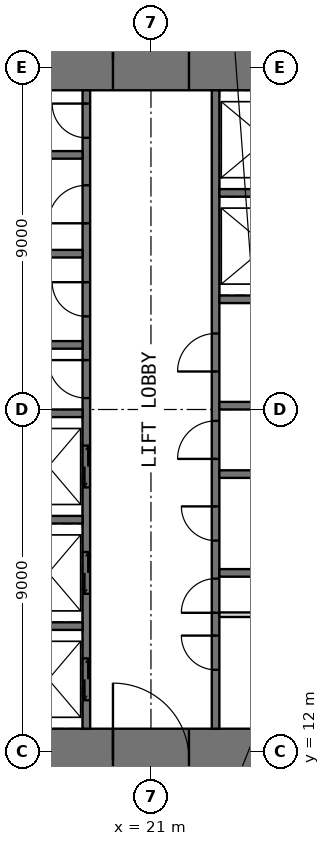
"""IFC4 building model, lengths in metres.
Left out: names, types, materials, properties, quantities, classifications, styles, units other than length and angle.
Written with IfcOpenShell. Run it as: python <this file> out.ifc"""

import sys

from ifc_helpers import new_model, si_unit, direction, frame, frame_2d, origin, place, context, subcontext, project, spatial, rectangle, extrude, element, fill, save


model = new_model("IFC4")
c1 = context("Model", 3, precision=1e-05, world=origin(), true_north=direction((0.0, 1.0)))
c2 = subcontext(c1, "Body", "Model", "MODEL_VIEW")
j1 = project(units=[si_unit("LENGTHUNIT", "METRE"), si_unit("PLANEANGLEUNIT", "RADIAN")], contexts=[c1])
p1 = place(None, origin())
s1 = spatial("IfcSite", under=j1, at=p1, CompositionType="ELEMENT")
p2 = place(p1, origin())
s2 = spatial("IfcBuilding", under=s1, at=p2, CompositionType="ELEMENT")
p3 = place(p2, frame((0.0, 0.0, 132.5)))
s3 = spatial("IfcBuildingStorey", under=s2, at=p3, CompositionType="ELEMENT", Elevation=132.5)
p4 = place(p3, frame((11.0, 11.8, -0.05), z_axis=(0.0, 0.0, 1.0), x_axis=(1.0, 0.0, 0.0)))
e1 = element("IfcWall", 1, at=p4, inside=s3, PredefinedType="SHEAR", context=c2, shape_type="SweptSolid", body=[
    extrude(rectangle(XDim=20.0, YDim=1.6, at=frame_2d((10.0, 0.0))), origin(), (0.0, 0.0, 1.0), 4.0),
])
p5 = place(p4, frame((9.0, 0.0, 0.05)))
e2 = element("IfcOpeningElement", 2, at=p5, cuts=e1, PredefinedType="OPENING", context=c2, shape_type="SweptSolid", body=[
    extrude(rectangle(XDim=2.0, YDim=2.2, at=frame_2d((1.0, 1.1))), frame((0.0, 0.81, 0.0), z_axis=(0.0, -1.0, 0.0), x_axis=(1.0, 0.0, 0.0)), (0.0, 0.0, 1.0), 1.62),
])
p6 = place(p3, frame((11.0, 30.2, -0.05), z_axis=(0.0, 0.0, 1.0), x_axis=(1.0, 0.0, 0.0)))
e3 = element("IfcWall", 3, at=p6, inside=s3, PredefinedType="SHEAR", context=c2, shape_type="SweptSolid", body=[
    extrude(rectangle(XDim=20.0, YDim=1.6, at=frame_2d((10.0, 0.0))), origin(), (0.0, 0.0, 1.0), 4.0),
])
p7 = place(p6, frame((9.0, 0.0, 0.05)))
e4 = element("IfcOpeningElement", 4, at=p7, cuts=e3, PredefinedType="OPENING", context=c2, shape_type="SweptSolid", body=[
    extrude(rectangle(XDim=2.0, YDim=2.2, at=frame_2d((1.0, 1.1))), frame((0.0, 0.81, 0.0), z_axis=(0.0, -1.0, 0.0), x_axis=(1.0, 0.0, 0.0)), (0.0, 0.0, 1.0), 1.62),
])
p8 = place(p3, frame((19.3, 12.6, -0.05), z_axis=(0.0, 0.0, 1.0), x_axis=(0.0, 1.0, 0.0)))
e5 = element("IfcWall", 5, at=p8, inside=s3, PredefinedType="SHEAR", context=c2, shape_type="SweptSolid", body=[
    extrude(rectangle(XDim=16.8, YDim=0.2, at=frame_2d((8.4, 0.0))), origin(), (0.0, 0.0, 1.0), 4.0),
])
p9 = place(p8, frame((8.7, 0.0, 0.05)))
e6 = element("IfcOpeningElement", 6, at=p9, cuts=e5, PredefinedType="OPENING", context=c2, shape_type="SweptSolid", body=[
    extrude(rectangle(XDim=1.0, YDim=2.2, at=frame_2d((0.5, 1.1))), frame((0.0, 0.11, 0.0), z_axis=(0.0, -1.0, 0.0), x_axis=(1.0, 0.0, 0.0)), (0.0, 0.0, 1.0), 0.22),
])
p10 = place(p8, frame((10.85, 0.0, 0.05)))
e7 = element("IfcOpeningElement", 7, at=p10, cuts=e5, PredefinedType="OPENING", context=c2, shape_type="SweptSolid", body=[
    extrude(rectangle(XDim=0.9, YDim=2.2, at=frame_2d((0.45, 1.1))), frame((0.0, 0.11, 0.0), z_axis=(0.0, -1.0, 0.0), x_axis=(1.0, 0.0, 0.0)), (0.0, 0.0, 1.0), 0.22),
])
p11 = place(p8, frame((13.3, 0.0, 0.05)))
e8 = element("IfcOpeningElement", 8, at=p11, cuts=e5, PredefinedType="OPENING", context=c2, shape_type="SweptSolid", body=[
    extrude(rectangle(XDim=1.0, YDim=2.2, at=frame_2d((0.5, 1.1))), frame((0.0, 0.11, 0.0), z_axis=(0.0, -1.0, 0.0), x_axis=(1.0, 0.0, 0.0)), (0.0, 0.0, 1.0), 0.22),
])
p12 = place(p8, frame((15.55, 0.0, 0.05)))
e9 = element("IfcOpeningElement", 9, at=p12, cuts=e5, PredefinedType="OPENING", context=c2, shape_type="SweptSolid", body=[
    extrude(rectangle(XDim=0.9, YDim=2.2, at=frame_2d((0.45, 1.1))), frame((0.0, 0.11, 0.0), z_axis=(0.0, -1.0, 0.0), x_axis=(1.0, 0.0, 0.0)), (0.0, 0.0, 1.0), 0.22),
])
p13 = place(p8, frame((0.75, 0.0, 0.05)))
e10 = element("IfcOpeningElement", 10, at=p13, cuts=e5, PredefinedType="OPENING", context=c2, shape_type="SweptSolid", body=[
    extrude(rectangle(XDim=1.1, YDim=2.2, at=frame_2d((0.55, 1.1))), frame((0.0, 0.11, 0.0), z_axis=(0.0, -1.0, 0.0), x_axis=(1.0, 0.0, 0.0)), (0.0, 0.0, 1.0), 0.22),
])
p14 = place(p8, frame((3.55, 0.0, 0.05)))
e11 = element("IfcOpeningElement", 11, at=p14, cuts=e5, PredefinedType="OPENING", context=c2, shape_type="SweptSolid", body=[
    extrude(rectangle(XDim=1.1, YDim=2.2, at=frame_2d((0.55, 1.1))), frame((0.0, 0.11, 0.0), z_axis=(0.0, -1.0, 0.0), x_axis=(1.0, 0.0, 0.0)), (0.0, 0.0, 1.0), 0.22),
])
p15 = place(p8, frame((6.35, 0.0, 0.05)))
e12 = element("IfcOpeningElement", 12, at=p15, cuts=e5, PredefinedType="OPENING", context=c2, shape_type="SweptSolid", body=[
    extrude(rectangle(XDim=1.1, YDim=2.2, at=frame_2d((0.55, 1.1))), frame((0.0, 0.11, 0.0), z_axis=(0.0, -1.0, 0.0), x_axis=(1.0, 0.0, 0.0)), (0.0, 0.0, 1.0), 0.22),
])
p16 = place(p3, frame((22.7, 12.6, -0.05), z_axis=(0.0, 0.0, 1.0), x_axis=(0.0, 1.0, 0.0)))
e13 = element("IfcWall", 13, at=p16, inside=s3, PredefinedType="SHEAR", context=c2, shape_type="SweptSolid", body=[
    extrude(rectangle(XDim=16.8, YDim=0.2, at=frame_2d((8.4, 0.0))), origin(), (0.0, 0.0, 1.0), 4.0),
])
p17 = place(p16, frame((3.05, 0.0, 0.05)))
e14 = element("IfcOpeningElement", 14, at=p17, cuts=e13, PredefinedType="OPENING", context=c2, shape_type="SweptSolid", body=[
    extrude(rectangle(XDim=0.9, YDim=2.2, at=frame_2d((0.45, 1.1))), frame((0.0, 0.11, 0.0), z_axis=(0.0, -1.0, 0.0), x_axis=(1.0, 0.0, 0.0)), (0.0, 0.0, 1.0), 0.22),
])
p18 = place(p16, frame((7.1, 0.0, 0.05)))
e15 = element("IfcOpeningElement", 15, at=p18, cuts=e13, PredefinedType="OPENING", context=c2, shape_type="SweptSolid", body=[
    extrude(rectangle(XDim=1.0, YDim=2.2, at=frame_2d((0.5, 1.1))), frame((0.0, 0.11, 0.0), z_axis=(0.0, -1.0, 0.0), x_axis=(1.0, 0.0, 0.0)), (0.0, 0.0, 1.0), 0.22),
])
p19 = place(p16, frame((1.55, 0.0, 0.05)))
e16 = element("IfcOpeningElement", 16, at=p19, cuts=e13, PredefinedType="OPENING", context=c2, shape_type="SweptSolid", body=[
    extrude(rectangle(XDim=0.9, YDim=2.2, at=frame_2d((0.45, 1.1))), frame((0.0, 0.11, 0.0), z_axis=(0.0, -1.0, 0.0), x_axis=(1.0, 0.0, 0.0)), (0.0, 0.0, 1.0), 0.22),
])
p20 = place(p16, frame((4.95, 0.0, 0.05)))
e17 = element("IfcOpeningElement", 17, at=p20, cuts=e13, PredefinedType="OPENING", context=c2, shape_type="SweptSolid", body=[
    extrude(rectangle(XDim=0.9, YDim=2.2, at=frame_2d((0.45, 1.1))), frame((0.0, 0.11, 0.0), z_axis=(0.0, -1.0, 0.0), x_axis=(1.0, 0.0, 0.0)), (0.0, 0.0, 1.0), 0.22),
])
p21 = place(p16, frame((9.4, 0.0, 0.05)))
e18 = element("IfcOpeningElement", 18, at=p21, cuts=e13, PredefinedType="OPENING", context=c2, shape_type="SweptSolid", body=[
    extrude(rectangle(XDim=1.0, YDim=2.2, at=frame_2d((0.5, 1.1))), frame((0.0, 0.11, 0.0), z_axis=(0.0, -1.0, 0.0), x_axis=(1.0, 0.0, 0.0)), (0.0, 0.0, 1.0), 0.22),
])
for number, where, z_axis, x_axis in (
    (19, (16.0, 15.3, -0.05), (0.0, 0.0, 1.0), (1.0, 0.0, 0.0)),
    (20, (16.0, 18.1, -0.05), (0.0, 0.0, 1.0), (1.0, 0.0, 0.0)),
    (21, (16.0, 20.9, -0.05), (0.0, 0.0, 1.0), (1.0, 0.0, 0.0)),
    (22, (16.0, 22.7, -0.05), (0.0, 0.0, 1.0), (1.0, 0.0, 0.0)),
    (23, (16.0, 25.1, -0.05), (0.0, 0.0, 1.0), (1.0, 0.0, 0.0)),
    (24, (16.0, 27.7, -0.05), (0.0, 0.0, 1.0), (1.0, 0.0, 0.0)),
    (25, (22.8, 16.7, -0.05), (0.0, 0.0, 1.0), (1.0, 0.0, 0.0)),
    (26, (22.8, 19.3, -0.05), (0.0, 0.0, 1.0), (1.0, 0.0, 0.0)),
    (27, (22.8, 21.1, -0.05), (0.0, 0.0, 1.0), (1.0, 0.0, 0.0)),
    (28, (22.8, 23.9, -0.05), (0.0, 0.0, 1.0), (1.0, 0.0, 0.0)),
    (29, (22.8, 26.7, -0.05), (0.0, 0.0, 1.0), (1.0, 0.0, 0.0)),
):
    element("IfcWall", number, at=place(p3, frame(where, z_axis=z_axis, x_axis=x_axis)), inside=s3, PredefinedType="SHEAR", context=c2, shape_type="SweptSolid", body=[
        extrude(rectangle(XDim=3.2, YDim=0.2, at=frame_2d((1.6, 0.0))), origin(), (0.0, 0.0, 1.0), 4.0),
    ])
p22 = place(p3, frame((22.8, 15.6, 0.0), z_axis=(0.0, 0.0, 1.0), x_axis=(1.0, 0.0, 0.0)))
e30 = element("IfcWall", 30, at=p22, inside=s3, PredefinedType="PARTITIONING", context=c2, shape_type="SweptSolid", body=[
    extrude(rectangle(XDim=3.2, YDim=0.12, at=frame_2d((1.6, 0.0))), origin(), (0.0, 0.0, 1.0), 3.75),
])
p23 = place(p5, origin())
e31 = element("IfcDoor", 31, at=p23, inside=s3, OperationType="DOUBLE_DOOR_SINGLE_SWING", PredefinedType="DOOR", context=c2, shape_type="SweptSolid", body=[
    extrude(rectangle(XDim=2.0, YDim=2.2, at=frame_2d((1.0, 1.1))), frame((0.0, 0.025, 0.0), z_axis=(0.0, -1.0, 0.0), x_axis=(1.0, 0.0, 0.0)), (0.0, 0.0, 1.0), 0.05),
])
fill(e2, e31)
p24 = place(p7, origin())
e32 = element("IfcDoor", 32, at=p24, inside=s3, OperationType="DOUBLE_DOOR_SINGLE_SWING", PredefinedType="DOOR", context=c2, shape_type="SweptSolid", body=[
    extrude(rectangle(XDim=2.0, YDim=2.2, at=frame_2d((1.0, 1.1))), frame((0.0, 0.025, 0.0), z_axis=(0.0, -1.0, 0.0), x_axis=(1.0, 0.0, 0.0)), (0.0, 0.0, 1.0), 0.05),
])
fill(e4, e32)
p25 = place(p17, origin())
e33 = element("IfcDoor", 33, at=p25, inside=s3, OperationType="SINGLE_SWING_LEFT", PredefinedType="DOOR", context=c2, shape_type="SweptSolid", body=[
    extrude(rectangle(XDim=0.9, YDim=2.2, at=frame_2d((0.45, 1.1))), frame((0.0, 0.025, 0.0), z_axis=(0.0, -1.0, 0.0), x_axis=(1.0, 0.0, 0.0)), (0.0, 0.0, 1.0), 0.05),
])
fill(e14, e33)
p26 = place(p9, origin())
e34 = element("IfcDoor", 34, at=p26, inside=s3, OperationType="SINGLE_SWING_RIGHT", PredefinedType="DOOR", context=c2, shape_type="SweptSolid", body=[
    extrude(rectangle(XDim=1.0, YDim=2.2, at=frame_2d((0.5, 1.1))), frame((0.0, 0.025, 0.0), z_axis=(0.0, -1.0, 0.0), x_axis=(1.0, 0.0, 0.0)), (0.0, 0.0, 1.0), 0.05),
])
fill(e6, e34)
p27 = place(p18, origin())
e35 = element("IfcDoor", 35, at=p27, inside=s3, OperationType="SINGLE_SWING_LEFT", PredefinedType="DOOR", context=c2, shape_type="SweptSolid", body=[
    extrude(rectangle(XDim=1.0, YDim=2.2, at=frame_2d((0.5, 1.1))), frame((0.0, 0.025, 0.0), z_axis=(0.0, -1.0, 0.0), x_axis=(1.0, 0.0, 0.0)), (0.0, 0.0, 1.0), 0.05),
])
fill(e15, e35)
p28 = place(p10, origin())
e36 = element("IfcDoor", 36, at=p28, inside=s3, OperationType="SINGLE_SWING_RIGHT", PredefinedType="DOOR", context=c2, shape_type="SweptSolid", body=[
    extrude(rectangle(XDim=0.9, YDim=2.2, at=frame_2d((0.45, 1.1))), frame((0.0, 0.025, 0.0), z_axis=(0.0, -1.0, 0.0), x_axis=(1.0, 0.0, 0.0)), (0.0, 0.0, 1.0), 0.05),
])
fill(e7, e36)
p29 = place(p11, origin())
e37 = element("IfcDoor", 37, at=p29, inside=s3, OperationType="SINGLE_SWING_LEFT", PredefinedType="DOOR", context=c2, shape_type="SweptSolid", body=[
    extrude(rectangle(XDim=1.0, YDim=2.2, at=frame_2d((0.5, 1.1))), frame((0.0, 0.025, 0.0), z_axis=(0.0, -1.0, 0.0), x_axis=(1.0, 0.0, 0.0)), (0.0, 0.0, 1.0), 0.05),
])
fill(e8, e37)
p30 = place(p12, origin())
e38 = element("IfcDoor", 38, at=p30, inside=s3, OperationType="SINGLE_SWING_RIGHT", PredefinedType="DOOR", context=c2, shape_type="SweptSolid", body=[
    extrude(rectangle(XDim=0.9, YDim=2.2, at=frame_2d((0.45, 1.1))), frame((0.0, 0.025, 0.0), z_axis=(0.0, -1.0, 0.0), x_axis=(1.0, 0.0, 0.0)), (0.0, 0.0, 1.0), 0.05),
])
fill(e9, e38)
p31 = place(p19, origin())
e39 = element("IfcDoor", 39, at=p31, inside=s3, OperationType="SINGLE_SWING_RIGHT", PredefinedType="DOOR", context=c2, shape_type="SweptSolid", body=[
    extrude(rectangle(XDim=0.9, YDim=2.2, at=frame_2d((0.45, 1.1))), frame((0.0, 0.025, 0.0), z_axis=(0.0, -1.0, 0.0), x_axis=(1.0, 0.0, 0.0)), (0.0, 0.0, 1.0), 0.05),
])
fill(e16, e39)
p32 = place(p20, origin())
e40 = element("IfcDoor", 40, at=p32, inside=s3, OperationType="SINGLE_SWING_RIGHT", PredefinedType="DOOR", context=c2, shape_type="SweptSolid", body=[
    extrude(rectangle(XDim=0.9, YDim=2.2, at=frame_2d((0.45, 1.1))), frame((0.0, 0.025, 0.0), z_axis=(0.0, -1.0, 0.0), x_axis=(1.0, 0.0, 0.0)), (0.0, 0.0, 1.0), 0.05),
])
fill(e17, e40)
p33 = place(p21, origin())
e41 = element("IfcDoor", 41, at=p33, inside=s3, OperationType="SINGLE_SWING_LEFT", PredefinedType="DOOR", context=c2, shape_type="SweptSolid", body=[
    extrude(rectangle(XDim=1.0, YDim=2.2, at=frame_2d((0.5, 1.1))), frame((0.0, 0.025, 0.0), z_axis=(0.0, -1.0, 0.0), x_axis=(1.0, 0.0, 0.0)), (0.0, 0.0, 1.0), 0.05),
])
fill(e18, e41)
p34 = place(p13, origin())
e42 = element("IfcDoor", 42, at=p34, inside=s3, OperationType="DOUBLE_DOOR_SLIDING", PredefinedType="DOOR", context=c2, shape_type="SweptSolid", body=[
    extrude(rectangle(XDim=1.1, YDim=2.2, at=frame_2d((0.55, 1.1))), frame((0.0, 0.025, 0.0), z_axis=(0.0, -1.0, 0.0), x_axis=(1.0, 0.0, 0.0)), (0.0, 0.0, 1.0), 0.05),
])
fill(e10, e42)
p35 = place(p14, origin())
e43 = element("IfcDoor", 43, at=p35, inside=s3, OperationType="DOUBLE_DOOR_SLIDING", PredefinedType="DOOR", context=c2, shape_type="SweptSolid", body=[
    extrude(rectangle(XDim=1.1, YDim=2.2, at=frame_2d((0.55, 1.1))), frame((0.0, 0.025, 0.0), z_axis=(0.0, -1.0, 0.0), x_axis=(1.0, 0.0, 0.0)), (0.0, 0.0, 1.0), 0.05),
])
fill(e11, e43)
p36 = place(p15, origin())
e44 = element("IfcDoor", 44, at=p36, inside=s3, OperationType="DOUBLE_DOOR_SLIDING", PredefinedType="DOOR", context=c2, shape_type="SweptSolid", body=[
    extrude(rectangle(XDim=1.1, YDim=2.2, at=frame_2d((0.55, 1.1))), frame((0.0, 0.025, 0.0), z_axis=(0.0, -1.0, 0.0), x_axis=(1.0, 0.0, 0.0)), (0.0, 0.0, 1.0), 0.05),
])
fill(e12, e44)
save(model, sys.argv[1])
